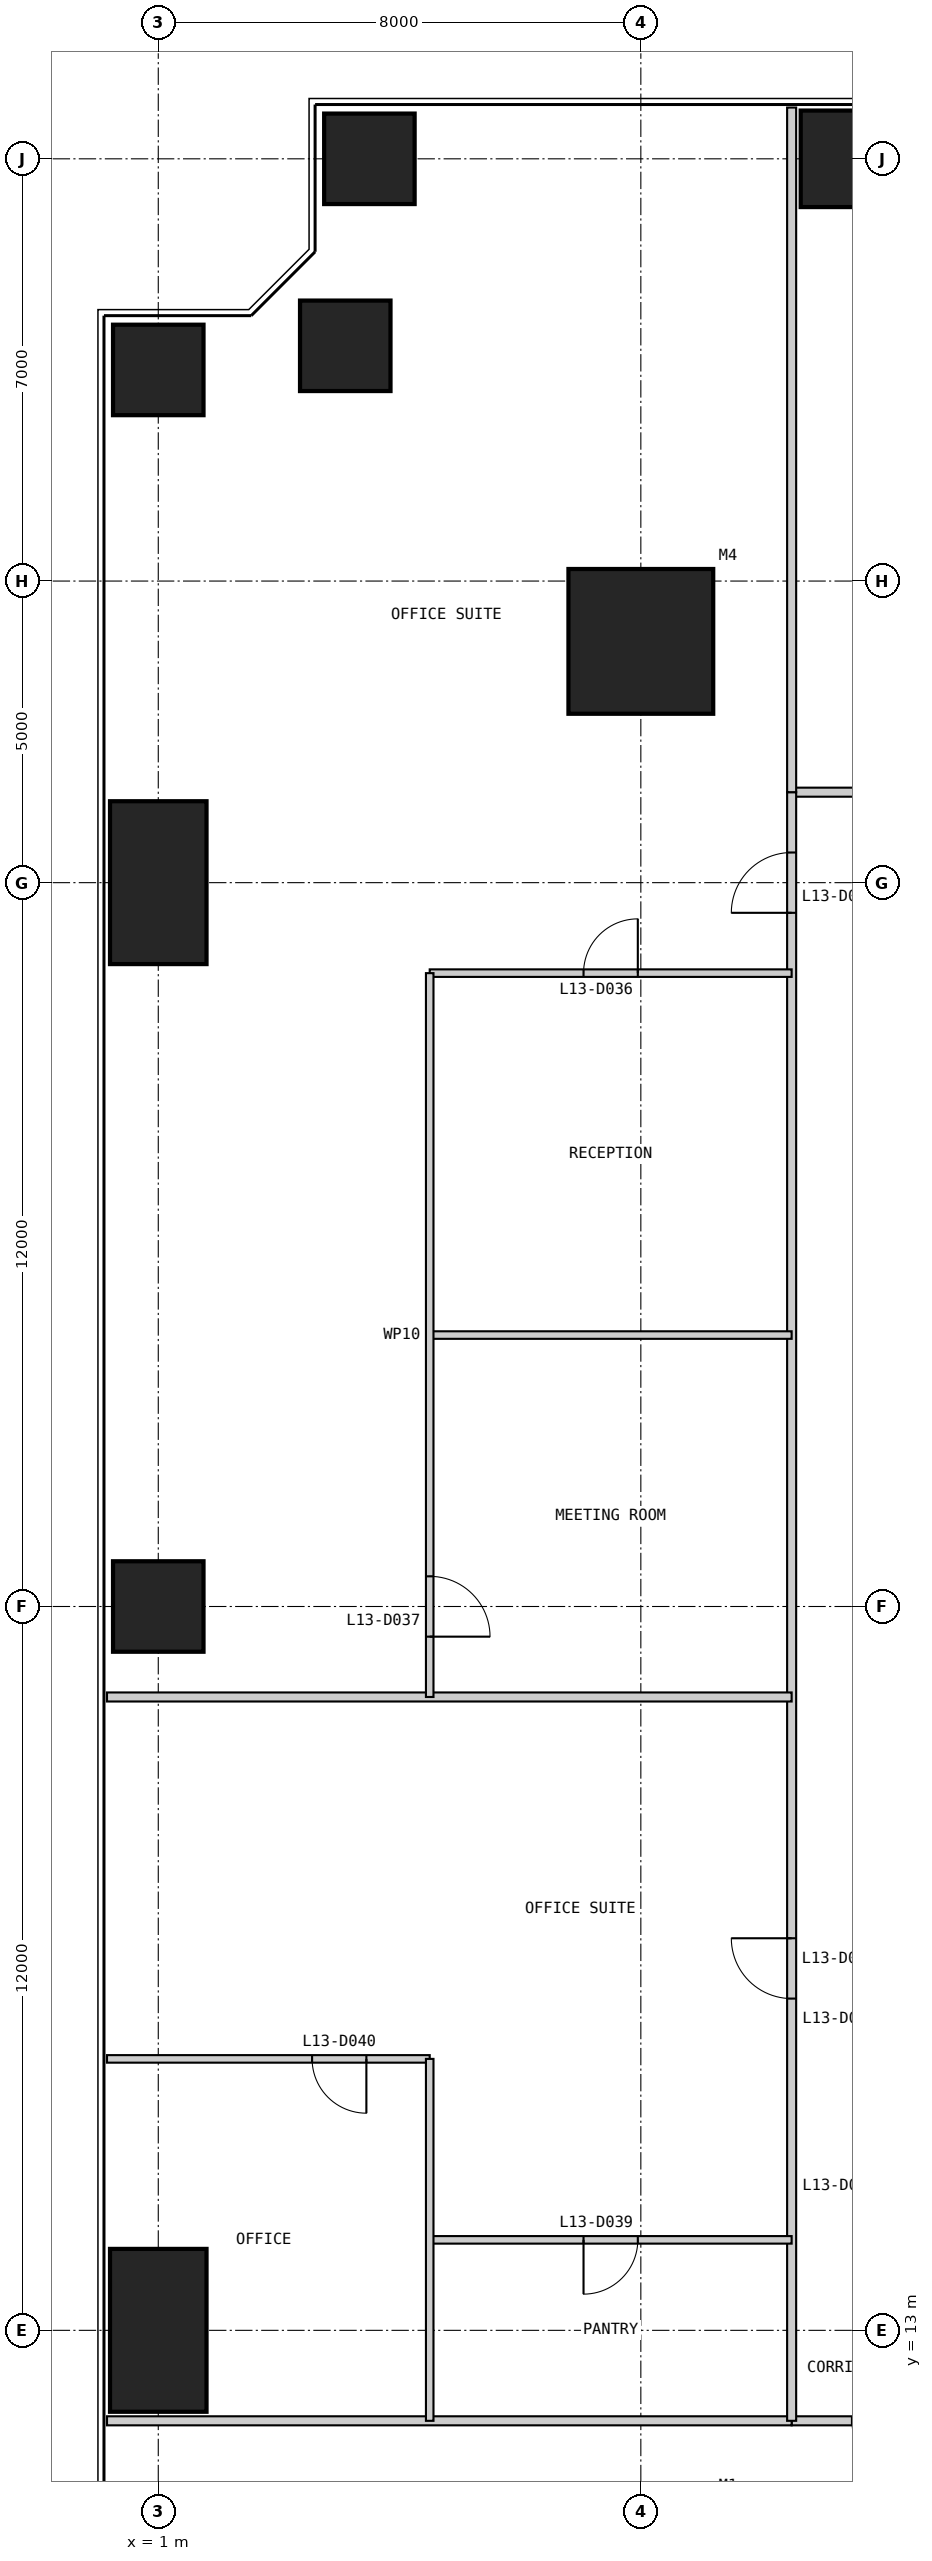
"""IFC4 building model, lengths in metres.
Left out: names, types, materials, properties, quantities, classifications, styles, units other than length and angle.
Written with IfcOpenShell. Run it as: python <this file> out.ifc"""

import sys

from ifc_helpers import new_model, si_unit, direction, frame, frame_2d, origin, origin_2d, place, context, subcontext, project, spatial, rectangle, extrude, element, fill, save


model = new_model("IFC4")
c1 = context("Model", 3, precision=1e-05, world=origin(), true_north=direction((0.0, 1.0)))
c2 = subcontext(c1, "Body", "Model", "MODEL_VIEW")
j1 = project(units=[si_unit("LENGTHUNIT", "METRE"), si_unit("PLANEANGLEUNIT", "RADIAN")], contexts=[c1])
p1 = place(None, origin())
s1 = spatial("IfcSite", under=j1, at=p1, CompositionType="ELEMENT")
p2 = place(p1, origin())
s2 = spatial("IfcBuilding", under=s1, at=p2, CompositionType="ELEMENT")
p3 = place(p2, frame((0.0, 0.0, 59.0)))
s3 = spatial("IfcBuildingStorey", under=s2, at=p3, CompositionType="ELEMENT", Elevation=59.0)
p4 = place(p3, frame((9.0, 41.0, 0.0), z_axis=(0.0, 0.0, 1.0), x_axis=(1.0, 0.0, 0.0)))
e1 = element("IfcColumn", 1, at=p4, inside=s3, PredefinedType="COLUMN", context=c2, shape_type="SweptSolid", body=[
    extrude(rectangle(XDim=2.4, YDim=2.4, at=origin_2d()), origin(), (0.0, 0.0, 1.0), 4.0),
])
p5 = place(p3, frame((13.0, 49.0, 0.0), z_axis=(0.0, 0.0, 1.0), x_axis=(1.0, 0.0, 0.0)))
e2 = element("IfcColumn", 2, at=p5, inside=s3, PredefinedType="COLUMN", context=c2, shape_type="SweptSolid", body=[
    extrude(rectangle(XDim=2.7, YDim=1.6, at=origin_2d()), origin(), (0.0, 0.0, 1.0), 4.0),
])
for number, where, z_axis, x_axis in (
    (3, (4.5, 49.0, 0.0), (0.0, 0.0, 1.0), (1.0, 0.0, 0.0)),
    (4, (4.1, 45.9, 0.0), (0.0, 0.0, 1.0), (1.0, 0.0, 0.0)),
    (5, (1.0, 45.5, 0.0), (0.0, 0.0, 1.0), (1.0, 0.0, 0.0)),
):
    element("IfcColumn", number, at=place(p3, frame(where, z_axis=z_axis, x_axis=x_axis)), inside=s3, PredefinedType="COLUMN", context=c2, shape_type="SweptSolid", body=[
        extrude(rectangle(XDim=1.5, YDim=1.5, at=origin_2d()), origin(), (0.0, 0.0, 1.0), 4.0),
    ])
p6 = place(p3, frame((1.0, 37.0, 0.0), z_axis=(0.0, 0.0, 1.0), x_axis=(1.0, 0.0, 0.0)))
e6 = element("IfcColumn", 6, at=p6, inside=s3, PredefinedType="COLUMN", context=c2, shape_type="SweptSolid", body=[
    extrude(rectangle(XDim=1.6, YDim=2.7, at=origin_2d()), origin(), (0.0, 0.0, 1.0), 4.0),
])
p7 = place(p3, frame((1.0, 25.0, 0.0), z_axis=(0.0, 0.0, 1.0), x_axis=(1.0, 0.0, 0.0)))
e7 = element("IfcColumn", 7, at=p7, inside=s3, PredefinedType="COLUMN", context=c2, shape_type="SweptSolid", body=[
    extrude(rectangle(XDim=1.5, YDim=1.5, at=origin_2d()), origin(), (0.0, 0.0, 1.0), 4.0),
])
p8 = place(p3, frame((1.0, 13.0, 0.0), z_axis=(0.0, 0.0, 1.0), x_axis=(1.0, 0.0, 0.0)))
e8 = element("IfcColumn", 8, at=p8, inside=s3, PredefinedType="COLUMN", context=c2, shape_type="SweptSolid", body=[
    extrude(rectangle(XDim=1.6, YDim=2.7, at=origin_2d()), origin(), (0.0, 0.0, 1.0), 4.0),
])
p9 = place(p3, frame((11.5, 11.5, 0.0), z_axis=(0.0, 0.0, 1.0), x_axis=(1.0, 0.0, 0.0)))
e9 = element("IfcWall", 9, at=p9, inside=s3, PredefinedType="PARTITIONING", context=c2, shape_type="SweptSolid", body=[
    extrude(rectangle(XDim=27.0, YDim=0.15, at=frame_2d((13.5, 0.0))), origin(), (0.0, 0.0, 1.0), 3.85),
])
p10 = place(p9, frame((1.0, 0.0, 0.0)))
e10 = element("IfcOpeningElement", 10, at=p10, cuts=e9, PredefinedType="OPENING", context=c2, shape_type="SweptSolid", body=[
    extrude(rectangle(XDim=1.0, YDim=2.2, at=frame_2d((0.5, 1.1))), frame((0.0, 0.085, 0.0), z_axis=(0.0, -1.0, 0.0), x_axis=(1.0, 0.0, 0.0)), (0.0, 0.0, 1.0), 0.17),
])
p11 = place(p9, frame((5.5, 0.0, 0.0)))
e11 = element("IfcOpeningElement", 11, at=p11, cuts=e9, PredefinedType="OPENING", context=c2, shape_type="SweptSolid", body=[
    extrude(rectangle(XDim=1.0, YDim=2.2, at=frame_2d((0.5, 1.1))), frame((0.0, 0.085, 0.0), z_axis=(0.0, -1.0, 0.0), x_axis=(1.0, 0.0, 0.0)), (0.0, 0.0, 1.0), 0.17),
])
p12 = place(p9, frame((11.5, 0.0, 0.0)))
e12 = element("IfcOpeningElement", 12, at=p12, cuts=e9, PredefinedType="OPENING", context=c2, shape_type="SweptSolid", body=[
    extrude(rectangle(XDim=1.0, YDim=2.2, at=frame_2d((0.5, 1.1))), frame((0.0, 0.085, 0.0), z_axis=(0.0, -1.0, 0.0), x_axis=(1.0, 0.0, 0.0)), (0.0, 0.0, 1.0), 0.17),
])
p13 = place(p9, frame((19.0, 0.0, 0.0)))
e13 = element("IfcOpeningElement", 13, at=p13, cuts=e9, PredefinedType="OPENING", context=c2, shape_type="SweptSolid", body=[
    extrude(rectangle(XDim=1.0, YDim=2.2, at=frame_2d((0.5, 1.1))), frame((0.0, 0.085, 0.0), z_axis=(0.0, -1.0, 0.0), x_axis=(1.0, 0.0, 0.0)), (0.0, 0.0, 1.0), 0.17),
])
p14 = place(p3, frame((0.15, 11.5, 0.0), z_axis=(0.0, 0.0, 1.0), x_axis=(1.0, 0.0, 0.0)))
e14 = element("IfcWall", 14, at=p14, inside=s3, PredefinedType="PARTITIONING", context=c2, shape_type="SweptSolid", body=[
    extrude(rectangle(XDim=11.35, YDim=0.15, at=frame_2d((5.675, 0.0))), origin(), (0.0, 0.0, 1.0), 3.85),
])
p15 = place(p3, frame((38.5, 38.5, 0.0), z_axis=(0.0, 0.0, 1.0), x_axis=(-1.0, 0.0, 0.0)))
e15 = element("IfcWall", 15, at=p15, inside=s3, PredefinedType="PARTITIONING", context=c2, shape_type="SweptSolid", body=[
    extrude(rectangle(XDim=27.0, YDim=0.15, at=frame_2d((13.5, 0.0))), origin(), (0.0, 0.0, 1.0), 3.85),
])
p16 = place(p15, frame((4.0, 0.0, 0.0)))
e16 = element("IfcOpeningElement", 16, at=p16, cuts=e15, PredefinedType="OPENING", context=c2, shape_type="SweptSolid", body=[
    extrude(rectangle(XDim=1.0, YDim=2.2, at=frame_2d((0.5, 1.1))), frame((0.0, 0.085, 0.0), z_axis=(0.0, -1.0, 0.0), x_axis=(1.0, 0.0, 0.0)), (0.0, 0.0, 1.0), 0.17),
])
p17 = place(p15, frame((10.0, 0.0, 0.0)))
e17 = element("IfcOpeningElement", 17, at=p17, cuts=e15, PredefinedType="OPENING", context=c2, shape_type="SweptSolid", body=[
    extrude(rectangle(XDim=1.0, YDim=2.2, at=frame_2d((0.5, 1.1))), frame((0.0, 0.085, 0.0), z_axis=(0.0, -1.0, 0.0), x_axis=(1.0, 0.0, 0.0)), (0.0, 0.0, 1.0), 0.17),
])
p18 = place(p15, frame((17.5, 0.0, 0.0)))
e18 = element("IfcOpeningElement", 18, at=p18, cuts=e15, PredefinedType="OPENING", context=c2, shape_type="SweptSolid", body=[
    extrude(rectangle(XDim=1.0, YDim=2.2, at=frame_2d((0.5, 1.1))), frame((0.0, 0.085, 0.0), z_axis=(0.0, -1.0, 0.0), x_axis=(1.0, 0.0, 0.0)), (0.0, 0.0, 1.0), 0.17),
])
p19 = place(p15, frame((23.5, 0.0, 0.0)))
e19 = element("IfcOpeningElement", 19, at=p19, cuts=e15, PredefinedType="OPENING", context=c2, shape_type="SweptSolid", body=[
    extrude(rectangle(XDim=1.0, YDim=2.2, at=frame_2d((0.5, 1.1))), frame((0.0, 0.085, 0.0), z_axis=(0.0, -1.0, 0.0), x_axis=(1.0, 0.0, 0.0)), (0.0, 0.0, 1.0), 0.17),
])
p20 = place(p3, frame((11.5, 38.5, 0.0), z_axis=(0.0, 0.0, 1.0), x_axis=(0.0, -1.0, 0.0)))
e20 = element("IfcWall", 20, at=p20, inside=s3, PredefinedType="PARTITIONING", context=c2, shape_type="SweptSolid", body=[
    extrude(rectangle(XDim=27.0, YDim=0.15, at=frame_2d((13.5, 0.0))), origin(), (0.0, 0.0, 1.0), 3.85),
])
p21 = place(p20, frame((1.0, 0.0, 0.0)))
e21 = element("IfcOpeningElement", 21, at=p21, cuts=e20, PredefinedType="OPENING", context=c2, shape_type="SweptSolid", body=[
    extrude(rectangle(XDim=1.0, YDim=2.2, at=frame_2d((0.5, 1.1))), frame((0.0, 0.085, 0.0), z_axis=(0.0, -1.0, 0.0), x_axis=(1.0, 0.0, 0.0)), (0.0, 0.0, 1.0), 0.17),
])
p22 = place(p20, frame((19.0, 0.0, 0.0)))
e22 = element("IfcOpeningElement", 22, at=p22, cuts=e20, PredefinedType="OPENING", context=c2, shape_type="SweptSolid", body=[
    extrude(rectangle(XDim=1.0, YDim=2.2, at=frame_2d((0.5, 1.1))), frame((0.0, 0.085, 0.0), z_axis=(0.0, -1.0, 0.0), x_axis=(1.0, 0.0, 0.0)), (0.0, 0.0, 1.0), 0.17),
])
p23 = place(p3, frame((11.5, 49.85, 0.0), z_axis=(0.0, 0.0, 1.0), x_axis=(0.0, -1.0, 0.0)))
e23 = element("IfcWall", 23, at=p23, inside=s3, PredefinedType="PARTITIONING", context=c2, shape_type="SweptSolid", body=[
    extrude(rectangle(XDim=11.35, YDim=0.15, at=frame_2d((5.675, 0.0))), origin(), (0.0, 0.0, 1.0), 3.85),
])
p24 = place(p3, frame((5.5, 35.5, 0.0), z_axis=(0.0, 0.0, 1.0), x_axis=(1.0, 0.0, 0.0)))
e24 = element("IfcWall", 24, at=p24, inside=s3, PredefinedType="PARTITIONING", context=c2, shape_type="SweptSolid", body=[
    extrude(rectangle(XDim=6.0, YDim=0.125, at=frame_2d((3.0, 0.0))), origin(), (0.0, 0.0, 1.0), 3.85),
])
p25 = place(p24, frame((2.55, 0.0, 0.0)))
e25 = element("IfcOpeningElement", 25, at=p25, cuts=e24, PredefinedType="OPENING", context=c2, shape_type="SweptSolid", body=[
    extrude(rectangle(XDim=0.9, YDim=2.2, at=frame_2d((0.45, 1.1))), frame((0.0, 0.073, 0.0), z_axis=(0.0, -1.0, 0.0), x_axis=(1.0, 0.0, 0.0)), (0.0, 0.0, 1.0), 0.145),
])
p26 = place(p3, frame((5.5, 29.5, 0.0), z_axis=(0.0, 0.0, 1.0), x_axis=(1.0, 0.0, 0.0)))
e26 = element("IfcWall", 26, at=p26, inside=s3, PredefinedType="PARTITIONING", context=c2, shape_type="SweptSolid", body=[
    extrude(rectangle(XDim=6.0, YDim=0.125, at=frame_2d((3.0, 0.0))), origin(), (0.0, 0.0, 1.0), 3.85),
])
p27 = place(p3, frame((0.15, 23.5, 0.0), z_axis=(0.0, 0.0, 1.0), x_axis=(1.0, 0.0, 0.0)))
e27 = element("IfcWall", 27, at=p27, inside=s3, PredefinedType="PARTITIONING", context=c2, shape_type="SweptSolid", body=[
    extrude(rectangle(XDim=11.35, YDim=0.15, at=frame_2d((5.675, 0.0))), origin(), (0.0, 0.0, 1.0), 3.85),
])
p28 = place(p3, frame((0.15, 17.5, 0.0), z_axis=(0.0, 0.0, 1.0), x_axis=(1.0, 0.0, 0.0)))
e28 = element("IfcWall", 28, at=p28, inside=s3, PredefinedType="PARTITIONING", context=c2, shape_type="SweptSolid", body=[
    extrude(rectangle(XDim=5.35, YDim=0.125, at=frame_2d((2.675, 0.0))), origin(), (0.0, 0.0, 1.0), 3.85),
])
p29 = place(p28, frame((3.4, 0.0, 0.0)))
e29 = element("IfcOpeningElement", 29, at=p29, cuts=e28, PredefinedType="OPENING", context=c2, shape_type="SweptSolid", body=[
    extrude(rectangle(XDim=0.9, YDim=2.2, at=frame_2d((0.45, 1.1))), frame((0.0, 0.073, 0.0), z_axis=(0.0, -1.0, 0.0), x_axis=(1.0, 0.0, 0.0)), (0.0, 0.0, 1.0), 0.145),
])
p30 = place(p3, frame((5.5, 14.5, 0.0), z_axis=(0.0, 0.0, 1.0), x_axis=(1.0, 0.0, 0.0)))
e30 = element("IfcWall", 30, at=p30, inside=s3, PredefinedType="PARTITIONING", context=c2, shape_type="SweptSolid", body=[
    extrude(rectangle(XDim=6.0, YDim=0.125, at=frame_2d((3.0, 0.0))), origin(), (0.0, 0.0, 1.0), 3.85),
])
p31 = place(p30, frame((2.55, 0.0, 0.0)))
e31 = element("IfcOpeningElement", 31, at=p31, cuts=e30, PredefinedType="OPENING", context=c2, shape_type="SweptSolid", body=[
    extrude(rectangle(XDim=0.9, YDim=2.2, at=frame_2d((0.45, 1.1))), frame((0.0, 0.073, 0.0), z_axis=(0.0, -1.0, 0.0), x_axis=(1.0, 0.0, 0.0)), (0.0, 0.0, 1.0), 0.145),
])
p32 = place(p3, frame((5.5, 35.5, 0.0), z_axis=(0.0, 0.0, 1.0), x_axis=(0.0, -1.0, 0.0)))
e32 = element("IfcWall", 32, at=p32, inside=s3, PredefinedType="PARTITIONING", context=c2, shape_type="SweptSolid", body=[
    extrude(rectangle(XDim=12.0, YDim=0.125, at=frame_2d((6.0, 0.0))), origin(), (0.0, 0.0, 1.0), 3.85),
])
p33 = place(p32, frame((10.0, 0.0, 0.0)))
e33 = element("IfcOpeningElement", 33, at=p33, cuts=e32, PredefinedType="OPENING", context=c2, shape_type="SweptSolid", body=[
    extrude(rectangle(XDim=1.0, YDim=2.2, at=frame_2d((0.5, 1.1))), frame((0.0, 0.073, 0.0), z_axis=(0.0, -1.0, 0.0), x_axis=(1.0, 0.0, 0.0)), (0.0, 0.0, 1.0), 0.145),
])
p34 = place(p3, frame((5.5, 17.5, 0.0), z_axis=(0.0, 0.0, 1.0), x_axis=(0.0, -1.0, 0.0)))
e34 = element("IfcWall", 34, at=p34, inside=s3, PredefinedType="PARTITIONING", context=c2, shape_type="SweptSolid", body=[
    extrude(rectangle(XDim=6.0, YDim=0.125, at=frame_2d((3.0, 0.0))), origin(), (0.0, 0.0, 1.0), 3.85),
])
p35 = place(p21, frame((1.0, 0.0, 0.0), z_axis=(0.0, 0.0, 1.0), x_axis=(-1.0, 0.0, 0.0)))
e35 = element("IfcDoor", 35, at=p35, inside=s3, OperationType="SINGLE_SWING_LEFT", PredefinedType="DOOR", context=c2, shape_type="SweptSolid", body=[
    extrude(rectangle(XDim=1.0, YDim=2.2, at=frame_2d((0.5, 1.1))), frame((0.0, 0.025, 0.0), z_axis=(0.0, -1.0, 0.0), x_axis=(1.0, 0.0, 0.0)), (0.0, 0.0, 1.0), 0.05),
])
fill(e21, e35)
p36 = place(p25, origin())
e36 = element("IfcDoor", 36, at=p36, inside=s3, OperationType="SINGLE_SWING_RIGHT", PredefinedType="DOOR", context=c2, shape_type="SweptSolid", body=[
    extrude(rectangle(XDim=0.9, YDim=2.2, at=frame_2d((0.45, 1.1))), frame((0.0, 0.025, 0.0), z_axis=(0.0, -1.0, 0.0), x_axis=(1.0, 0.0, 0.0)), (0.0, 0.0, 1.0), 0.05),
])
fill(e25, e36)
p37 = place(p33, origin())
e37 = element("IfcDoor", 37, at=p37, inside=s3, OperationType="SINGLE_SWING_RIGHT", PredefinedType="DOOR", context=c2, shape_type="SweptSolid", body=[
    extrude(rectangle(XDim=1.0, YDim=2.2, at=frame_2d((0.5, 1.1))), frame((0.0, 0.025, 0.0), z_axis=(0.0, -1.0, 0.0), x_axis=(1.0, 0.0, 0.0)), (0.0, 0.0, 1.0), 0.05),
])
fill(e33, e37)
p38 = place(p22, frame((1.0, 0.0, 0.0), z_axis=(0.0, 0.0, 1.0), x_axis=(-1.0, 0.0, 0.0)))
e38 = element("IfcDoor", 38, at=p38, inside=s3, OperationType="SINGLE_SWING_RIGHT", PredefinedType="DOOR", context=c2, shape_type="SweptSolid", body=[
    extrude(rectangle(XDim=1.0, YDim=2.2, at=frame_2d((0.5, 1.1))), frame((0.0, 0.025, 0.0), z_axis=(0.0, -1.0, 0.0), x_axis=(1.0, 0.0, 0.0)), (0.0, 0.0, 1.0), 0.05),
])
fill(e22, e38)
p39 = place(p31, frame((0.9, 0.0, 0.0), z_axis=(0.0, 0.0, 1.0), x_axis=(-1.0, 0.0, 0.0)))
e39 = element("IfcDoor", 39, at=p39, inside=s3, OperationType="SINGLE_SWING_RIGHT", PredefinedType="DOOR", context=c2, shape_type="SweptSolid", body=[
    extrude(rectangle(XDim=0.9, YDim=2.2, at=frame_2d((0.45, 1.1))), frame((0.0, 0.025, 0.0), z_axis=(0.0, -1.0, 0.0), x_axis=(1.0, 0.0, 0.0)), (0.0, 0.0, 1.0), 0.05),
])
fill(e31, e39)
p40 = place(p29, frame((0.9, 0.0, 0.0), z_axis=(0.0, 0.0, 1.0), x_axis=(-1.0, 0.0, 0.0)))
e40 = element("IfcDoor", 40, at=p40, inside=s3, OperationType="SINGLE_SWING_LEFT", PredefinedType="DOOR", context=c2, shape_type="SweptSolid", body=[
    extrude(rectangle(XDim=0.9, YDim=2.2, at=frame_2d((0.45, 1.1))), frame((0.0, 0.025, 0.0), z_axis=(0.0, -1.0, 0.0), x_axis=(1.0, 0.0, 0.0)), (0.0, 0.0, 1.0), 0.05),
])
fill(e29, e40)
save(model, sys.argv[1])
